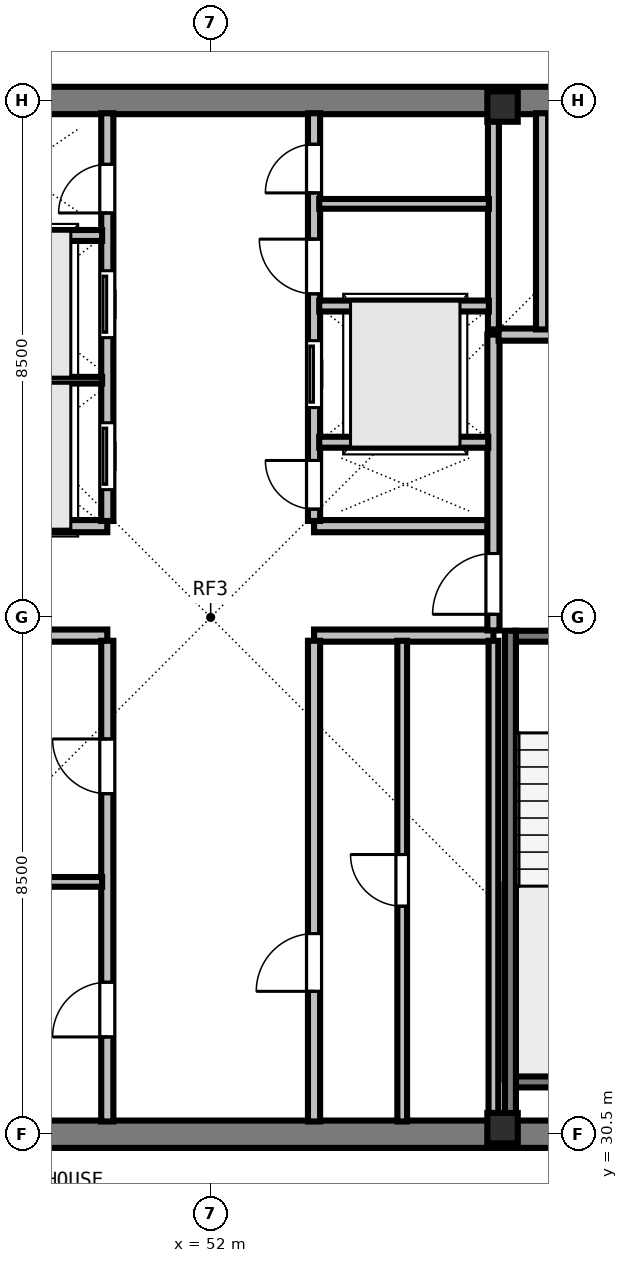
"""IFC4 building model, lengths in metres.
Left out: names, types, materials, properties, quantities, classifications, styles, units other than length and angle.
Written with IfcOpenShell. Run it as: python <this file> out.ifc"""

import sys

from ifc_helpers import new_model, si_unit, direction, frame, frame_2d, origin, origin_2d, place, context, subcontext, project, spatial, rectangle, i_section, extrude, element, fill, save


model = new_model("IFC4")
c1 = context("Model", 3, precision=1e-05, world=origin(), true_north=direction((0.0, 1.0)))
c2 = subcontext(c1, "Body", "Model", "MODEL_VIEW")
j1 = project(units=[si_unit("LENGTHUNIT", "METRE"), si_unit("PLANEANGLEUNIT", "RADIAN")], contexts=[c1])
p1 = place(None, origin())
s1 = spatial("IfcSite", under=j1, at=p1, CompositionType="ELEMENT")
p2 = place(p1, origin())
s2 = spatial("IfcBuilding", under=s1, at=p2, CompositionType="ELEMENT")
p3 = place(p2, frame((0.0, 0.0, 280.5)))
s3 = spatial("IfcBuildingStorey", under=s2, at=p3, CompositionType="ELEMENT", Elevation=280.5)
for number, where, z_axis, x_axis in (
    (1, (56.8, 30.6, 0.0), (0.0, 0.0, 1.0), (1.0, 0.0, 0.0)),
    (2, (56.8, 47.4, 0.0), (0.0, 0.0, 1.0), (1.0, 0.0, 0.0)),
):
    element("IfcColumn", number, at=place(p3, frame(where, z_axis=z_axis, x_axis=x_axis)), inside=s3, PredefinedType="COLUMN", context=c2, shape_type="SweptSolid", body=[
        extrude(i_section(OverallWidth=0.5, OverallDepth=0.5, WebThickness=0.028, FlangeThickness=0.045, at=origin_2d()), origin(), (0.0, 0.0, 1.0), 3.5),
    ])
for number, where, z_axis, x_axis in (
    (3, (43.275, 30.5, 0.0), (0.0, 0.0, 1.0), (1.0, 0.0, 0.0)),
    (4, (43.275, 47.5, 0.0), (0.0, 0.0, 1.0), (1.0, 0.0, 0.0)),
):
    element("IfcWall", number, at=place(p3, frame(where, z_axis=z_axis, x_axis=x_axis)), inside=s3, PredefinedType="SHEAR", context=c2, shape_type="SweptSolid", body=[
        extrude(rectangle(XDim=17.45, YDim=0.45, at=frame_2d((8.725, 0.0))), origin(), (0.0, 0.0, 1.0), 3.29),
    ])
for number, where, z_axis, x_axis in (
    (5, (47.35, 38.7, 0.0), (0.0, 0.0, 1.0), (1.0, 0.0, 0.0)),
    (6, (47.35, 40.5, 0.0), (0.0, 0.0, 1.0), (1.0, 0.0, 0.0)),
    (7, (53.7, 38.7, 0.0), (0.0, 0.0, 1.0), (1.0, 0.0, 0.0)),
    (8, (53.7, 40.5, 0.0), (0.0, 0.0, 1.0), (1.0, 0.0, 0.0)),
):
    element("IfcWall", number, at=place(p3, frame(where, z_axis=z_axis, x_axis=x_axis)), inside=s3, PredefinedType="SOLIDWALL", context=c2, shape_type="SweptSolid", body=[
        extrude(rectangle(XDim=2.95, YDim=0.2, at=frame_2d((1.475, 0.0))), origin(), (0.0, 0.0, 1.0), 3.29),
    ])
p4 = place(p3, frame((50.3, 30.71, 0.0), z_axis=(0.0, 0.0, 1.0), x_axis=(0.0, 1.0, 0.0)))
e9 = element("IfcWall", 9, at=p4, inside=s3, PredefinedType="SOLIDWALL", context=c2, shape_type="SweptSolid", body=[
    extrude(rectangle(XDim=7.905, YDim=0.2, at=frame_2d((3.953, 0.0))), origin(), (0.0, 0.0, 1.0), 3.29),
])
p5 = place(p4, frame((1.39, 0.0, 0.0)))
e10 = element("IfcOpeningElement", 10, at=p5, cuts=e9, PredefinedType="OPENING", context=c2, shape_type="SweptSolid", body=[
    extrude(rectangle(XDim=0.9, YDim=2.12, at=frame_2d((0.45, 1.06))), frame((0.0, 0.11, 0.0), z_axis=(0.0, -1.0, 0.0), x_axis=(1.0, 0.0, 0.0)), (0.0, 0.0, 1.0), 0.22),
])
p6 = place(p4, frame((5.39, 0.0, 0.0)))
e11 = element("IfcOpeningElement", 11, at=p6, cuts=e9, PredefinedType="OPENING", context=c2, shape_type="SweptSolid", body=[
    extrude(rectangle(XDim=0.9, YDim=2.12, at=frame_2d((0.45, 1.06))), frame((0.0, 0.11, 0.0), z_axis=(0.0, -1.0, 0.0), x_axis=(1.0, 0.0, 0.0)), (0.0, 0.0, 1.0), 0.22),
])
p7 = place(p3, frame((53.7, 30.71, 0.0), z_axis=(0.0, 0.0, 1.0), x_axis=(0.0, 1.0, 0.0)))
e12 = element("IfcWall", 12, at=p7, inside=s3, PredefinedType="SOLIDWALL", context=c2, shape_type="SweptSolid", body=[
    extrude(rectangle(XDim=7.905, YDim=0.2, at=frame_2d((3.953, 0.0))), origin(), (0.0, 0.0, 1.0), 3.29),
])
p8 = place(p7, frame((2.14, 0.0, 0.0)))
e13 = element("IfcOpeningElement", 13, at=p8, cuts=e12, PredefinedType="OPENING", context=c2, shape_type="SweptSolid", body=[
    extrude(rectangle(XDim=0.95, YDim=2.12, at=frame_2d((0.475, 1.06))), frame((0.0, 0.11, 0.0), z_axis=(0.0, -1.0, 0.0), x_axis=(1.0, 0.0, 0.0)), (0.0, 0.0, 1.0), 0.22),
])
p9 = place(p3, frame((50.3, 40.585, 0.0), z_axis=(0.0, 0.0, 1.0), x_axis=(0.0, 1.0, 0.0)))
e14 = element("IfcWall", 14, at=p9, inside=s3, PredefinedType="SOLIDWALL", context=c2, shape_type="SweptSolid", body=[
    extrude(rectangle(XDim=6.705, YDim=0.2, at=frame_2d((3.353, 0.0))), origin(), (0.0, 0.0, 1.0), 3.29),
])
p10 = place(p9, frame((0.515, 0.0, 0.0)))
e15 = element("IfcOpeningElement", 15, at=p10, cuts=e14, PredefinedType="OPENING", context=c2, shape_type="SweptSolid", body=[
    extrude(rectangle(XDim=1.1, YDim=2.2, at=frame_2d((0.55, 1.1))), frame((0.0, 0.11, 0.0), z_axis=(0.0, -1.0, 0.0), x_axis=(1.0, 0.0, 0.0)), (0.0, 0.0, 1.0), 0.22),
])
p11 = place(p9, frame((3.015, 0.0, 0.0)))
e16 = element("IfcOpeningElement", 16, at=p11, cuts=e14, PredefinedType="OPENING", context=c2, shape_type="SweptSolid", body=[
    extrude(rectangle(XDim=1.1, YDim=2.2, at=frame_2d((0.55, 1.1))), frame((0.0, 0.11, 0.0), z_axis=(0.0, -1.0, 0.0), x_axis=(1.0, 0.0, 0.0)), (0.0, 0.0, 1.0), 0.22),
])
p12 = place(p9, frame((5.065, 0.0, 0.0)))
e17 = element("IfcOpeningElement", 17, at=p12, cuts=e14, PredefinedType="OPENING", context=c2, shape_type="SweptSolid", body=[
    extrude(rectangle(XDim=0.8, YDim=2.08, at=frame_2d((0.4, 1.04))), frame((0.0, 0.11, 0.0), z_axis=(0.0, -1.0, 0.0), x_axis=(1.0, 0.0, 0.0)), (0.0, 0.0, 1.0), 0.22),
])
p13 = place(p3, frame((53.7, 40.585, 0.0), z_axis=(0.0, 0.0, 1.0), x_axis=(0.0, 1.0, 0.0)))
e18 = element("IfcWall", 18, at=p13, inside=s3, PredefinedType="SOLIDWALL", context=c2, shape_type="SweptSolid", body=[
    extrude(rectangle(XDim=6.705, YDim=0.2, at=frame_2d((3.353, 0.0))), origin(), (0.0, 0.0, 1.0), 3.29),
])
p14 = place(p13, frame((0.195, 0.0, 0.0)))
e19 = element("IfcOpeningElement", 19, at=p14, cuts=e18, PredefinedType="OPENING", context=c2, shape_type="SweptSolid", body=[
    extrude(rectangle(XDim=0.8, YDim=2.08, at=frame_2d((0.4, 1.04))), frame((0.0, 0.11, 0.0), z_axis=(0.0, -1.0, 0.0), x_axis=(1.0, 0.0, 0.0)), (0.0, 0.0, 1.0), 0.22),
])
p15 = place(p13, frame((1.865, 0.0, 0.0)))
e20 = element("IfcOpeningElement", 20, at=p15, cuts=e18, PredefinedType="OPENING", context=c2, shape_type="SweptSolid", body=[
    extrude(rectangle(XDim=1.1, YDim=2.2, at=frame_2d((0.55, 1.1))), frame((0.0, 0.11, 0.0), z_axis=(0.0, -1.0, 0.0), x_axis=(1.0, 0.0, 0.0)), (0.0, 0.0, 1.0), 0.22),
])
p16 = place(p13, frame((3.735, 0.0, 0.0)))
e21 = element("IfcOpeningElement", 21, at=p16, cuts=e18, PredefinedType="OPENING", context=c2, shape_type="SweptSolid", body=[
    extrude(rectangle(XDim=0.9, YDim=2.12, at=frame_2d((0.45, 1.06))), frame((0.0, 0.11, 0.0), z_axis=(0.0, -1.0, 0.0), x_axis=(1.0, 0.0, 0.0)), (0.0, 0.0, 1.0), 0.22),
])
p17 = place(p13, frame((5.395, 0.0, 0.0)))
e22 = element("IfcOpeningElement", 22, at=p17, cuts=e18, PredefinedType="OPENING", context=c2, shape_type="SweptSolid", body=[
    extrude(rectangle(XDim=0.8, YDim=2.1, at=frame_2d((0.4, 1.05))), frame((0.0, 0.11, 0.0), z_axis=(0.0, -1.0, 0.0), x_axis=(1.0, 0.0, 0.0)), (0.0, 0.0, 1.0), 0.22),
])
p18 = place(p3, frame((56.65, 38.785, 0.0), z_axis=(0.0, 0.0, 1.0), x_axis=(0.0, 1.0, 0.0)))
e23 = element("IfcWall", 23, at=p18, inside=s3, PredefinedType="SOLIDWALL", context=c2, shape_type="SweptSolid", body=[
    extrude(rectangle(XDim=4.865, YDim=0.2, at=frame_2d((2.433, 0.0))), origin(), (0.0, 0.0, 1.0), 3.29),
])
p19 = place(p18, frame((0.265, 0.0, 0.0)))
e24 = element("IfcOpeningElement", 24, at=p19, cuts=e23, PredefinedType="OPENING", context=c2, shape_type="SweptSolid", body=[
    extrude(rectangle(XDim=1.0, YDim=2.15, at=frame_2d((0.5, 1.075))), frame((0.0, 0.11, 0.0), z_axis=(0.0, -1.0, 0.0), x_axis=(1.0, 0.0, 0.0)), (0.0, 0.0, 1.0), 0.22),
])
p20 = place(p3, frame((56.735, 43.65, 0.0), z_axis=(0.0, 0.0, 1.0), x_axis=(1.0, 0.0, 0.0)))
e25 = element("IfcWall", 25, at=p20, inside=s3, PredefinedType="SOLIDWALL", context=c2, shape_type="SweptSolid", body=[
    extrude(rectangle(XDim=3.555, YDim=0.2, at=frame_2d((1.777, 0.0))), origin(), (0.0, 0.0, 1.0), 3.29),
])
p21 = place(p20, frame((1.295, 0.0, 0.0)))
e26 = element("IfcOpeningElement", 26, at=p21, cuts=e25, PredefinedType="OPENING", context=c2, shape_type="SweptSolid", body=[
    extrude(rectangle(XDim=1.1, YDim=2.2, at=frame_2d((0.55, 1.1))), frame((0.0, 0.11, 0.0), z_axis=(0.0, -1.0, 0.0), x_axis=(1.0, 0.0, 0.0)), (0.0, 0.0, 1.0), 0.22),
])
p22 = place(p3, frame((57.45, 43.735, 0.0), z_axis=(0.0, 0.0, 1.0), x_axis=(0.0, 1.0, 0.0)))
e27 = element("IfcWall", 27, at=p22, inside=s3, PredefinedType="SOLIDWALL", context=c2, shape_type="SweptSolid", body=[
    extrude(rectangle(XDim=3.555, YDim=0.2, at=frame_2d((1.777, 0.0))), origin(), (0.0, 0.0, 1.0), 3.29),
])
p23 = place(p3, frame((47.415, 34.65, 0.0), z_axis=(0.0, 0.0, 1.0), x_axis=(1.0, 0.0, 0.0)))
e28 = element("IfcWall", 28, at=p23, inside=s3, PredefinedType="PARTITIONING", context=c2, shape_type="SweptSolid", body=[
    extrude(rectangle(XDim=2.8, YDim=0.16, at=frame_2d((1.4, 0.0))), origin(), (0.0, 0.0, 1.0), 3.29),
])
p24 = place(p3, frame((56.65, 30.71, 0.0), z_axis=(0.0, 0.0, 1.0), x_axis=(0.0, 1.0, 0.0)))
e29 = element("IfcWall", 29, at=p24, inside=s3, PredefinedType="PARTITIONING", context=c2, shape_type="SweptSolid", body=[
    extrude(rectangle(XDim=7.905, YDim=0.16, at=frame_2d((3.953, 0.0))), origin(), (0.0, 0.0, 1.0), 3.29),
])
p25 = place(p3, frame((55.15, 30.71, 0.0), z_axis=(0.0, 0.0, 1.0), x_axis=(0.0, 1.0, 0.0)))
e30 = element("IfcWall", 30, at=p25, inside=s3, PredefinedType="PARTITIONING", context=c2, shape_type="SweptSolid", body=[
    extrude(rectangle(XDim=7.905, YDim=0.16, at=frame_2d((3.953, 0.0))), origin(), (0.0, 0.0, 1.0), 3.29),
])
p26 = place(p25, frame((3.54, 0.0, 0.0)))
e31 = element("IfcOpeningElement", 31, at=p26, cuts=e30, PredefinedType="OPENING", context=c2, shape_type="SweptSolid", body=[
    extrude(rectangle(XDim=0.85, YDim=2.12, at=frame_2d((0.425, 1.06))), frame((0.0, 0.09, 0.0), z_axis=(0.0, -1.0, 0.0), x_axis=(1.0, 0.0, 0.0)), (0.0, 0.0, 1.0), 0.18),
])
p27 = place(p3, frame((47.435, 42.9, 0.0), z_axis=(0.0, 0.0, 1.0), x_axis=(1.0, 0.0, 0.0)))
e32 = element("IfcWall", 32, at=p27, inside=s3, PredefinedType="PARTITIONING", context=c2, shape_type="SweptSolid", body=[
    extrude(rectangle(XDim=2.78, YDim=0.11, at=frame_2d((1.39, 0.0))), origin(), (0.0, 0.0, 1.0), 3.29),
])
p28 = place(p3, frame((47.425, 45.28, 0.0), z_axis=(0.0, 0.0, 1.0), x_axis=(1.0, 0.0, 0.0)))
e33 = element("IfcWall", 33, at=p28, inside=s3, PredefinedType="SOLIDWALL", context=c2, shape_type="SweptSolid", body=[
    extrude(rectangle(XDim=2.79, YDim=0.18, at=frame_2d((1.395, 0.0))), origin(), (0.0, 0.0, 1.0), 3.29),
])
p29 = place(p3, frame((56.65, 43.735, 0.0), z_axis=(0.0, 0.0, 1.0), x_axis=(0.0, 1.0, 0.0)))
e34 = element("IfcWall", 34, at=p29, inside=s3, PredefinedType="SOLIDWALL", context=c2, shape_type="SweptSolid", body=[
    extrude(rectangle(XDim=3.555, YDim=0.18, at=frame_2d((1.777, 0.0))), origin(), (0.0, 0.0, 1.0), 3.29),
])
p30 = place(p3, frame((53.785, 41.88, 0.0), z_axis=(0.0, 0.0, 1.0), x_axis=(1.0, 0.0, 0.0)))
e35 = element("IfcWall", 35, at=p30, inside=s3, PredefinedType="SOLIDWALL", context=c2, shape_type="SweptSolid", body=[
    extrude(rectangle(XDim=2.78, YDim=0.18, at=frame_2d((1.39, 0.0))), origin(), (0.0, 0.0, 1.0), 3.29),
])
p31 = place(p3, frame((53.785, 44.12, 0.0), z_axis=(0.0, 0.0, 1.0), x_axis=(1.0, 0.0, 0.0)))
e36 = element("IfcWall", 36, at=p31, inside=s3, PredefinedType="SOLIDWALL", context=c2, shape_type="SweptSolid", body=[
    extrude(rectangle(XDim=2.79, YDim=0.18, at=frame_2d((1.395, 0.0))), origin(), (0.0, 0.0, 1.0), 3.29),
])
p32 = place(p3, frame((53.785, 45.8, 0.0), z_axis=(0.0, 0.0, 1.0), x_axis=(1.0, 0.0, 0.0)))
e37 = element("IfcWall", 37, at=p32, inside=s3, PredefinedType="PARTITIONING", context=c2, shape_type="SweptSolid", body=[
    extrude(rectangle(XDim=2.79, YDim=0.16, at=frame_2d((1.395, 0.0))), origin(), (0.0, 0.0, 1.0), 3.29),
])
p33 = place(p3, frame((57.005, 38.69, 0.0), z_axis=(0.0, 0.0, 1.0), x_axis=(1.0, 0.0, 0.0)))
e38 = element("IfcWall", 38, at=p33, inside=s3, PredefinedType="SOLIDWALL", context=c2, shape_type="SweptSolid", body=[
    extrude(rectangle(XDim=3.28, YDim=0.18, at=frame_2d((1.64, 0.0))), origin(), (0.0, 0.0, 1.0), 3.29),
])
p34 = place(p33, frame((1.165, 0.0, 0.0)))
e39 = element("IfcOpeningElement", 39, at=p34, cuts=e38, PredefinedType="OPENING", context=c2, shape_type="SweptSolid", body=[
    extrude(rectangle(XDim=0.95, YDim=2.15, at=frame_2d((0.475, 1.075))), frame((0.0, 0.1, 0.0), z_axis=(0.0, -1.0, 0.0), x_axis=(1.0, 0.0, 0.0)), (0.0, 0.0, 1.0), 0.2),
])
p35 = place(p3, frame((57.005, 31.36, 0.0), z_axis=(0.0, 0.0, 1.0), x_axis=(1.0, 0.0, 0.0)))
e40 = element("IfcWall", 40, at=p35, inside=s3, PredefinedType="SOLIDWALL", context=c2, shape_type="SweptSolid", body=[
    extrude(rectangle(XDim=3.28, YDim=0.18, at=frame_2d((1.64, 0.0))), origin(), (0.0, 0.0, 1.0), 3.29),
])
p36 = place(p3, frame((56.93, 38.78, 0.0), z_axis=(0.0, 0.0, 1.0), x_axis=(0.0, -1.0, 0.0)))
e41 = element("IfcWall", 41, at=p36, inside=s3, PredefinedType="SOLIDWALL", context=c2, shape_type="SweptSolid", body=[
    extrude(rectangle(XDim=8.067, YDim=0.18, at=frame_2d((4.034, 0.0))), origin(), (0.0, 0.0, 1.0), 3.29),
])
p37 = place(p19, origin())
e42 = element("IfcDoor", 42, at=p37, inside=s3, OperationType="SINGLE_SWING_LEFT", PredefinedType="DOOR", context=c2, shape_type="SweptSolid", body=[
    extrude(rectangle(XDim=1.0, YDim=2.15, at=frame_2d((0.5, 1.075))), frame((0.0, 0.025, 0.0), z_axis=(0.0, -1.0, 0.0), x_axis=(1.0, 0.0, 0.0)), (0.0, 0.0, 1.0), 0.05),
])
fill(e24, e42)
p38 = place(p5, origin())
e43 = element("IfcDoor", 43, at=p38, inside=s3, OperationType="SINGLE_SWING_LEFT", PredefinedType="DOOR", context=c2, shape_type="SweptSolid", body=[
    extrude(rectangle(XDim=0.9, YDim=2.12, at=frame_2d((0.45, 1.06))), frame((0.0, 0.025, 0.0), z_axis=(0.0, -1.0, 0.0), x_axis=(1.0, 0.0, 0.0)), (0.0, 0.0, 1.0), 0.05),
])
fill(e10, e43)
p39 = place(p6, origin())
e44 = element("IfcDoor", 44, at=p39, inside=s3, OperationType="SINGLE_SWING_RIGHT", PredefinedType="DOOR", context=c2, shape_type="SweptSolid", body=[
    extrude(rectangle(XDim=0.9, YDim=2.12, at=frame_2d((0.45, 1.06))), frame((0.0, 0.025, 0.0), z_axis=(0.0, -1.0, 0.0), x_axis=(1.0, 0.0, 0.0)), (0.0, 0.0, 1.0), 0.05),
])
fill(e11, e44)
p40 = place(p8, origin())
e45 = element("IfcDoor", 45, at=p40, inside=s3, OperationType="SINGLE_SWING_LEFT", PredefinedType="DOOR", context=c2, shape_type="SweptSolid", body=[
    extrude(rectangle(XDim=0.95, YDim=2.12, at=frame_2d((0.475, 1.06))), frame((0.0, 0.025, 0.0), z_axis=(0.0, -1.0, 0.0), x_axis=(1.0, 0.0, 0.0)), (0.0, 0.0, 1.0), 0.05),
])
fill(e13, e45)
p41 = place(p26, origin())
e46 = element("IfcDoor", 46, at=p41, inside=s3, OperationType="SINGLE_SWING_RIGHT", PredefinedType="DOOR", context=c2, shape_type="SweptSolid", body=[
    extrude(rectangle(XDim=0.85, YDim=2.12, at=frame_2d((0.425, 1.06))), frame((0.0, 0.025, 0.0), z_axis=(0.0, -1.0, 0.0), x_axis=(1.0, 0.0, 0.0)), (0.0, 0.0, 1.0), 0.05),
])
fill(e31, e46)
p42 = place(p10, origin())
e47 = element("IfcDoor", 47, at=p42, inside=s3, OperationType="SLIDING_TO_LEFT", PredefinedType="DOOR", context=c2, shape_type="SweptSolid", body=[
    extrude(rectangle(XDim=1.1, YDim=2.2, at=frame_2d((0.55, 1.1))), frame((0.0, 0.025, 0.0), z_axis=(0.0, -1.0, 0.0), x_axis=(1.0, 0.0, 0.0)), (0.0, 0.0, 1.0), 0.05),
])
fill(e15, e47)
p43 = place(p11, origin())
e48 = element("IfcDoor", 48, at=p43, inside=s3, OperationType="SLIDING_TO_LEFT", PredefinedType="DOOR", context=c2, shape_type="SweptSolid", body=[
    extrude(rectangle(XDim=1.1, YDim=2.2, at=frame_2d((0.55, 1.1))), frame((0.0, 0.025, 0.0), z_axis=(0.0, -1.0, 0.0), x_axis=(1.0, 0.0, 0.0)), (0.0, 0.0, 1.0), 0.05),
])
fill(e16, e48)
p44 = place(p12, origin())
e49 = element("IfcDoor", 49, at=p44, inside=s3, OperationType="SINGLE_SWING_LEFT", PredefinedType="DOOR", context=c2, shape_type="SweptSolid", body=[
    extrude(rectangle(XDim=0.8, YDim=2.08, at=frame_2d((0.4, 1.04))), frame((0.0, 0.025, 0.0), z_axis=(0.0, -1.0, 0.0), x_axis=(1.0, 0.0, 0.0)), (0.0, 0.0, 1.0), 0.05),
])
fill(e17, e49)
p45 = place(p14, origin())
e50 = element("IfcDoor", 50, at=p45, inside=s3, OperationType="SINGLE_SWING_RIGHT", PredefinedType="DOOR", context=c2, shape_type="SweptSolid", body=[
    extrude(rectangle(XDim=0.8, YDim=2.08, at=frame_2d((0.4, 1.04))), frame((0.0, 0.025, 0.0), z_axis=(0.0, -1.0, 0.0), x_axis=(1.0, 0.0, 0.0)), (0.0, 0.0, 1.0), 0.05),
])
fill(e19, e50)
p46 = place(p15, origin())
e51 = element("IfcDoor", 51, at=p46, inside=s3, OperationType="SLIDING_TO_LEFT", PredefinedType="DOOR", context=c2, shape_type="SweptSolid", body=[
    extrude(rectangle(XDim=1.1, YDim=2.2, at=frame_2d((0.55, 1.1))), frame((0.0, 0.025, 0.0), z_axis=(0.0, -1.0, 0.0), x_axis=(1.0, 0.0, 0.0)), (0.0, 0.0, 1.0), 0.05),
])
fill(e20, e51)
p47 = place(p16, origin())
e52 = element("IfcDoor", 52, at=p47, inside=s3, OperationType="SINGLE_SWING_RIGHT", PredefinedType="DOOR", context=c2, shape_type="SweptSolid", body=[
    extrude(rectangle(XDim=0.9, YDim=2.12, at=frame_2d((0.45, 1.06))), frame((0.0, 0.025, 0.0), z_axis=(0.0, -1.0, 0.0), x_axis=(1.0, 0.0, 0.0)), (0.0, 0.0, 1.0), 0.05),
])
fill(e21, e52)
p48 = place(p17, origin())
e53 = element("IfcDoor", 53, at=p48, inside=s3, OperationType="SINGLE_SWING_LEFT", PredefinedType="DOOR", context=c2, shape_type="SweptSolid", body=[
    extrude(rectangle(XDim=0.8, YDim=2.1, at=frame_2d((0.4, 1.05))), frame((0.0, 0.025, 0.0), z_axis=(0.0, -1.0, 0.0), x_axis=(1.0, 0.0, 0.0)), (0.0, 0.0, 1.0), 0.05),
])
fill(e22, e53)
save(model, sys.argv[1])
